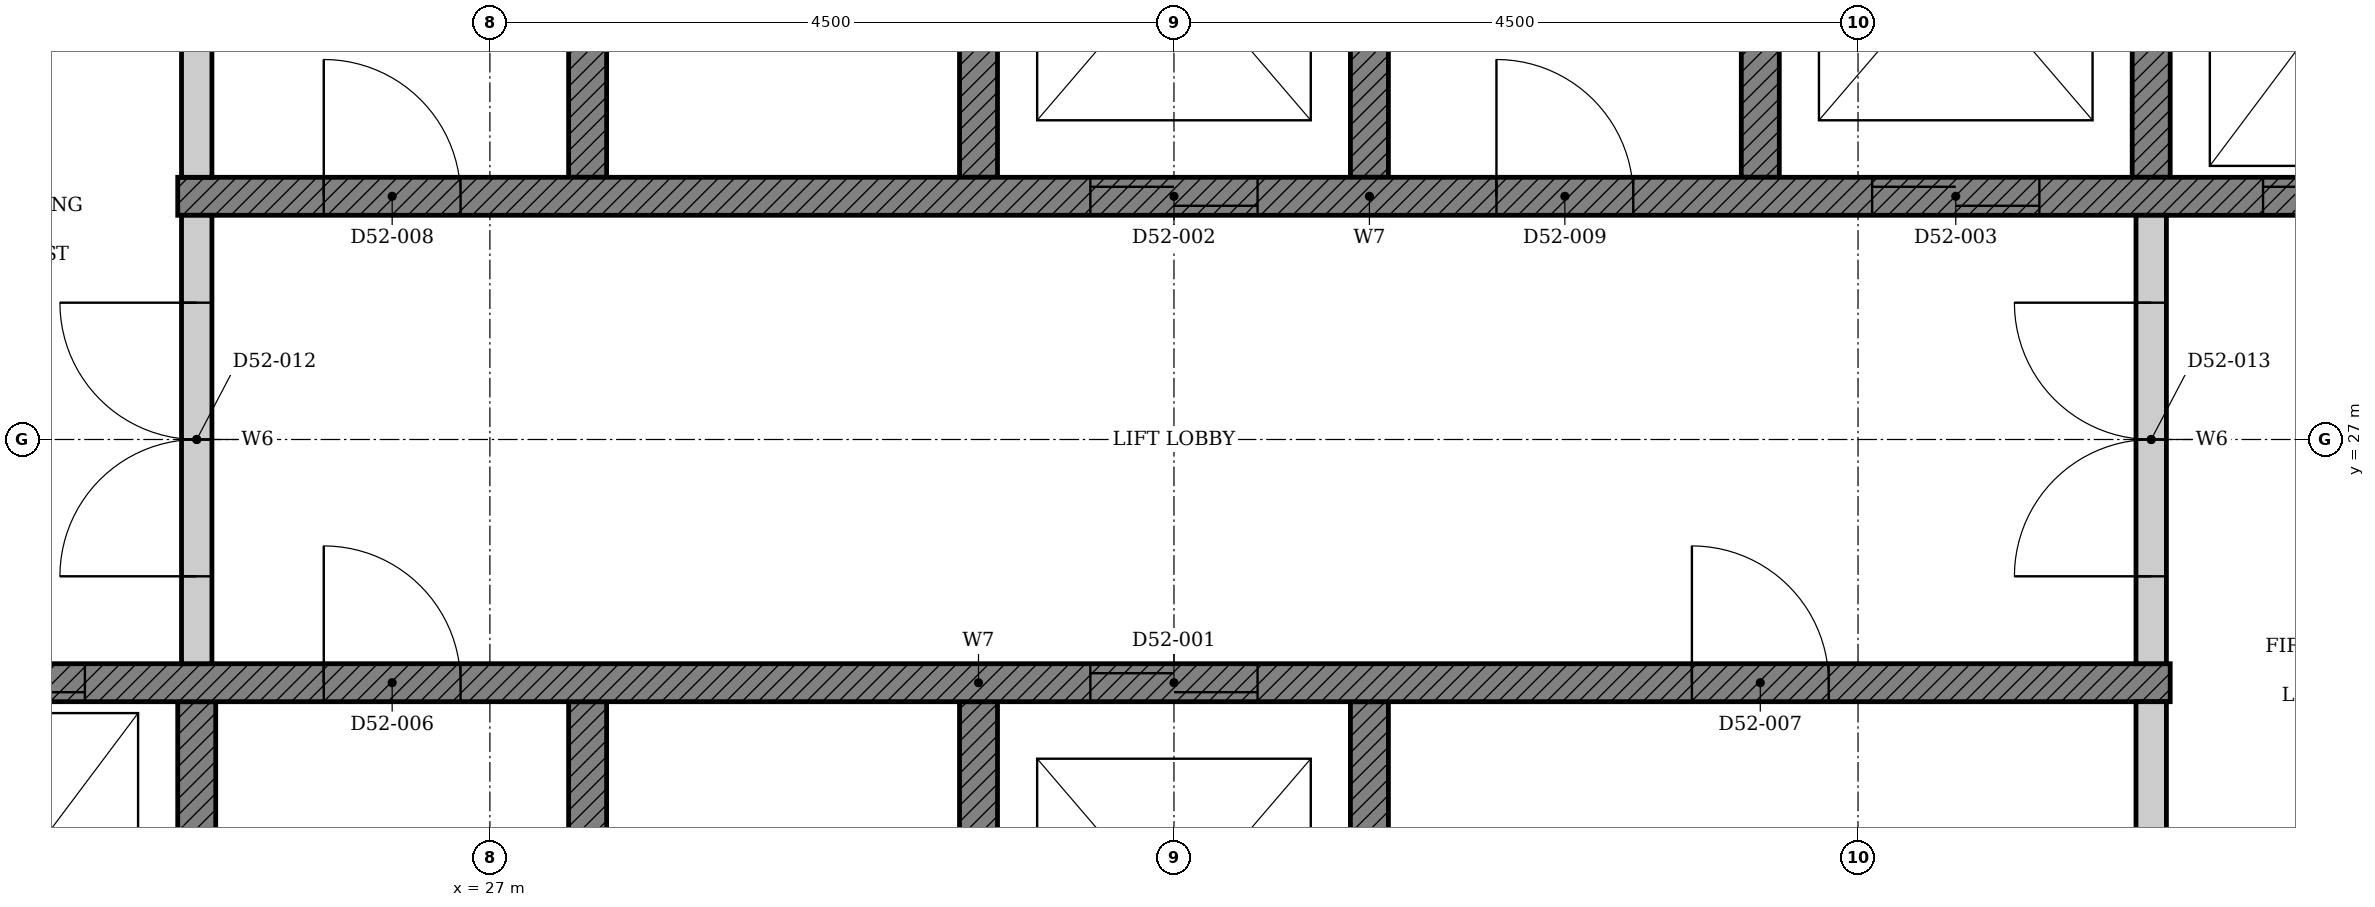
"""IFC4 building model, lengths in metres.
Left out: names, types, materials, properties, quantities, classifications, styles, units other than length and angle.
Written with IfcOpenShell. Run it as: python <this file> out.ifc"""

import sys

from ifc_helpers import new_model, si_unit, direction, frame, frame_2d, origin, place, context, subcontext, project, spatial, polyline, rectangle, outline, extrude, element, fill, save


model = new_model("IFC4")
c1 = context("Model", 3, precision=1e-05, world=origin(), true_north=direction((0.0, 1.0)))
c2 = subcontext(c1, "Body", "Model", "MODEL_VIEW")
j1 = project(units=[si_unit("LENGTHUNIT", "METRE"), si_unit("PLANEANGLEUNIT", "RADIAN")], contexts=[c1])
p1 = place(None, origin())
s1 = spatial("IfcSite", under=j1, at=p1, CompositionType="ELEMENT")
p2 = place(p1, origin())
s2 = spatial("IfcBuilding", under=s1, at=p2, CompositionType="ELEMENT")
p3 = place(p2, frame((0.0, 0.0, 207.2)))
s3 = spatial("IfcBuildingStorey", under=s2, at=p3, CompositionType="ELEMENT", Elevation=207.2)
p4 = place(p3, origin())
e1 = element("IfcWall", 1, at=p4, inside=s3, PredefinedType="SHEAR", context=c2, shape_type="SweptSolid", body=[
    extrude(outline(polyline([(22.375, 22.35), (25.197, 22.35), (25.197, 25.275), (24.947, 25.275), (24.947, 22.65), (22.625, 22.65), (22.625, 25.275), (22.375, 25.275), (22.375, 22.35)])), origin(), (0.0, 0.0, 1.0), 3.4),
])
p5 = place(p3, origin())
e2 = element("IfcWall", 2, at=p5, inside=s3, PredefinedType="SHEAR", context=c2, shape_type="SweptSolid", body=[
    extrude(outline(polyline([(27.518, 22.35), (32.911, 22.35), (32.911, 25.275), (32.661, 25.275), (32.661, 22.65), (30.339, 22.65), (30.339, 25.275), (30.089, 25.275), (30.089, 22.65), (27.768, 22.65), (27.768, 25.275), (27.518, 25.275), (27.518, 22.35)])), origin(), (0.0, 0.0, 1.0), 3.4),
])
p6 = place(p3, origin())
e3 = element("IfcWall", 3, at=p6, inside=s3, PredefinedType="SHEAR", context=c2, shape_type="SweptSolid", body=[
    extrude(outline(polyline([(27.518, 28.725), (27.768, 28.725), (27.768, 31.35), (30.089, 31.35), (30.089, 28.725), (30.339, 28.725), (30.339, 31.35), (32.661, 31.35), (32.661, 28.725), (32.911, 28.725), (32.911, 31.65), (27.518, 31.65), (27.518, 28.725)])), origin(), (0.0, 0.0, 1.0), 3.4),
])
p7 = place(p3, origin())
e4 = element("IfcWall", 4, at=p7, inside=s3, PredefinedType="SHEAR", context=c2, shape_type="SweptSolid", body=[
    extrude(outline(polyline([(35.232, 28.725), (35.482, 28.725), (35.482, 31.35), (37.803, 31.35), (37.803, 28.725), (38.053, 28.725), (38.053, 31.35), (40.375, 31.35), (40.375, 28.725), (40.625, 28.725), (40.625, 31.65), (35.232, 31.65), (35.232, 28.725)])), origin(), (0.0, 0.0, 1.0), 3.4),
])
p8 = place(p3, frame((22.375, 25.4, 0.0), z_axis=(0.0, 0.0, 1.0), x_axis=(1.0, 0.0, 0.0)))
e5 = element("IfcWall", 5, at=p8, inside=s3, PredefinedType="SHEAR", context=c2, shape_type="SweptSolid", body=[
    extrude(rectangle(XDim=15.678, YDim=0.25, at=frame_2d((7.839, 0.0))), origin(), (0.0, 0.0, 1.0), 3.4),
])
p9 = place(p8, frame((8.575, 0.0, 0.0)))
e6 = element("IfcOpeningElement", 6, at=p9, cuts=e5, PredefinedType="OPENING", context=c2, shape_type="SweptSolid", body=[
    extrude(rectangle(XDim=1.1, YDim=2.1, at=frame_2d((0.55, 1.05))), frame((0.0, 0.135, 0.0), z_axis=(0.0, -1.0, 0.0), x_axis=(1.0, 0.0, 0.0)), (0.0, 0.0, 1.0), 0.27),
])
p10 = place(p8, frame((0.861, 0.0, 0.0)))
e7 = element("IfcOpeningElement", 7, at=p10, cuts=e5, PredefinedType="OPENING", context=c2, shape_type="SweptSolid", body=[
    extrude(rectangle(XDim=1.1, YDim=2.1, at=frame_2d((0.55, 1.05))), frame((0.0, 0.135, 0.0), z_axis=(0.0, -1.0, 0.0), x_axis=(1.0, 0.0, 0.0)), (0.0, 0.0, 1.0), 0.27),
])
p11 = place(p8, frame((3.532, 0.0, 0.0)))
e8 = element("IfcOpeningElement", 8, at=p11, cuts=e5, PredefinedType="OPENING", context=c2, shape_type="SweptSolid", body=[
    extrude(rectangle(XDim=0.9, YDim=2.1, at=frame_2d((0.45, 1.05))), frame((0.0, 0.135, 0.0), z_axis=(0.0, -1.0, 0.0), x_axis=(1.0, 0.0, 0.0)), (0.0, 0.0, 1.0), 0.27),
])
p12 = place(p8, frame((12.532, 0.0, 0.0)))
e9 = element("IfcOpeningElement", 9, at=p12, cuts=e5, PredefinedType="OPENING", context=c2, shape_type="SweptSolid", body=[
    extrude(rectangle(XDim=0.9, YDim=2.1, at=frame_2d((0.45, 1.05))), frame((0.0, 0.135, 0.0), z_axis=(0.0, -1.0, 0.0), x_axis=(1.0, 0.0, 0.0)), (0.0, 0.0, 1.0), 0.27),
])
p13 = place(p3, frame((24.947, 28.6, 0.0), z_axis=(0.0, 0.0, 1.0), x_axis=(1.0, 0.0, 0.0)))
e10 = element("IfcWall", 10, at=p13, inside=s3, PredefinedType="SHEAR", context=c2, shape_type="SweptSolid", body=[
    extrude(rectangle(XDim=15.678, YDim=0.25, at=frame_2d((7.839, 0.0))), origin(), (0.0, 0.0, 1.0), 3.4),
])
p14 = place(p13, frame((6.004, 0.0, 0.0)))
e11 = element("IfcOpeningElement", 11, at=p14, cuts=e10, PredefinedType="OPENING", context=c2, shape_type="SweptSolid", body=[
    extrude(rectangle(XDim=1.1, YDim=2.1, at=frame_2d((0.55, 1.05))), frame((0.0, 0.135, 0.0), z_axis=(0.0, -1.0, 0.0), x_axis=(1.0, 0.0, 0.0)), (0.0, 0.0, 1.0), 0.27),
])
p15 = place(p13, frame((11.146, 0.0, 0.0)))
e12 = element("IfcOpeningElement", 12, at=p15, cuts=e10, PredefinedType="OPENING", context=c2, shape_type="SweptSolid", body=[
    extrude(rectangle(XDim=1.1, YDim=2.1, at=frame_2d((0.55, 1.05))), frame((0.0, 0.135, 0.0), z_axis=(0.0, -1.0, 0.0), x_axis=(1.0, 0.0, 0.0)), (0.0, 0.0, 1.0), 0.27),
])
p16 = place(p13, frame((13.718, 0.0, 0.0)))
e13 = element("IfcOpeningElement", 13, at=p16, cuts=e10, PredefinedType="OPENING", context=c2, shape_type="SweptSolid", body=[
    extrude(rectangle(XDim=1.1, YDim=2.1, at=frame_2d((0.55, 1.05))), frame((0.0, 0.135, 0.0), z_axis=(0.0, -1.0, 0.0), x_axis=(1.0, 0.0, 0.0)), (0.0, 0.0, 1.0), 0.27),
])
p17 = place(p13, frame((0.961, 0.0, 0.0)))
e14 = element("IfcOpeningElement", 14, at=p17, cuts=e10, PredefinedType="OPENING", context=c2, shape_type="SweptSolid", body=[
    extrude(rectangle(XDim=0.9, YDim=2.1, at=frame_2d((0.45, 1.05))), frame((0.0, 0.135, 0.0), z_axis=(0.0, -1.0, 0.0), x_axis=(1.0, 0.0, 0.0)), (0.0, 0.0, 1.0), 0.27),
])
p18 = place(p13, frame((8.675, 0.0, 0.0)))
e15 = element("IfcOpeningElement", 15, at=p18, cuts=e10, PredefinedType="OPENING", context=c2, shape_type="SweptSolid", body=[
    extrude(rectangle(XDim=0.9, YDim=2.1, at=frame_2d((0.45, 1.05))), frame((0.0, 0.135, 0.0), z_axis=(0.0, -1.0, 0.0), x_axis=(1.0, 0.0, 0.0)), (0.0, 0.0, 1.0), 0.27),
])
for number, where, z_axis, x_axis in (
    (16, (37.928, 22.65, 0.0), (0.0, 0.0, 1.0), (0.0, 1.0, 0.0)),
    (17, (25.072, 28.725, 0.0), (0.0, 0.0, 1.0), (0.0, 1.0, 0.0)),
):
    element("IfcWall", number, at=place(p3, frame(where, z_axis=z_axis, x_axis=x_axis)), inside=s3, PredefinedType="PARTITIONING", context=c2, shape_type="SweptSolid", body=[
        extrude(rectangle(XDim=2.625, YDim=0.2, at=frame_2d((1.312, 0.0))), origin(), (0.0, 0.0, 1.0), 3.4),
    ])
p19 = place(p3, frame((25.072, 25.525, 0.0), z_axis=(0.0, 0.0, 1.0), x_axis=(0.0, 1.0, 0.0)))
e18 = element("IfcWall", 18, at=p19, inside=s3, PredefinedType="PARTITIONING", context=c2, shape_type="SweptSolid", body=[
    extrude(rectangle(XDim=2.95, YDim=0.2, at=frame_2d((1.475, 0.0))), origin(), (0.0, 0.0, 1.0), 3.4),
])
p20 = place(p19, frame((0.575, 0.0, 0.0)))
e19 = element("IfcOpeningElement", 19, at=p20, cuts=e18, PredefinedType="OPENING", context=c2, shape_type="SweptSolid", body=[
    extrude(rectangle(XDim=1.8, YDim=2.1, at=frame_2d((0.9, 1.05))), frame((0.0, 0.11, 0.0), z_axis=(0.0, -1.0, 0.0), x_axis=(1.0, 0.0, 0.0)), (0.0, 0.0, 1.0), 0.22),
])
p21 = place(p3, frame((37.928, 25.525, 0.0), z_axis=(0.0, 0.0, 1.0), x_axis=(0.0, 1.0, 0.0)))
e20 = element("IfcWall", 20, at=p21, inside=s3, PredefinedType="PARTITIONING", context=c2, shape_type="SweptSolid", body=[
    extrude(rectangle(XDim=2.95, YDim=0.2, at=frame_2d((1.475, 0.0))), origin(), (0.0, 0.0, 1.0), 3.4),
])
p22 = place(p21, frame((0.575, 0.0, 0.0)))
e21 = element("IfcOpeningElement", 21, at=p22, cuts=e20, PredefinedType="OPENING", context=c2, shape_type="SweptSolid", body=[
    extrude(rectangle(XDim=1.8, YDim=2.1, at=frame_2d((0.9, 1.05))), frame((0.0, 0.11, 0.0), z_axis=(0.0, -1.0, 0.0), x_axis=(1.0, 0.0, 0.0)), (0.0, 0.0, 1.0), 0.22),
])
p23 = place(p9, origin())
e22 = element("IfcDoor", 22, at=p23, inside=s3, OperationType="DOUBLE_DOOR_SLIDING", PredefinedType="DOOR", context=c2, shape_type="SweptSolid", body=[
    extrude(rectangle(XDim=1.1, YDim=2.1, at=frame_2d((0.55, 1.05))), frame((0.0, 0.025, 0.0), z_axis=(0.0, -1.0, 0.0), x_axis=(1.0, 0.0, 0.0)), (0.0, 0.0, 1.0), 0.05),
])
fill(e6, e22)
p24 = place(p14, origin())
e23 = element("IfcDoor", 23, at=p24, inside=s3, OperationType="DOUBLE_DOOR_SLIDING", PredefinedType="DOOR", context=c2, shape_type="SweptSolid", body=[
    extrude(rectangle(XDim=1.1, YDim=2.1, at=frame_2d((0.55, 1.05))), frame((0.0, 0.025, 0.0), z_axis=(0.0, -1.0, 0.0), x_axis=(1.0, 0.0, 0.0)), (0.0, 0.0, 1.0), 0.05),
])
fill(e11, e23)
p25 = place(p15, origin())
e24 = element("IfcDoor", 24, at=p25, inside=s3, OperationType="DOUBLE_DOOR_SLIDING", PredefinedType="DOOR", context=c2, shape_type="SweptSolid", body=[
    extrude(rectangle(XDim=1.1, YDim=2.1, at=frame_2d((0.55, 1.05))), frame((0.0, 0.025, 0.0), z_axis=(0.0, -1.0, 0.0), x_axis=(1.0, 0.0, 0.0)), (0.0, 0.0, 1.0), 0.05),
])
fill(e12, e24)
p26 = place(p10, origin())
e25 = element("IfcDoor", 25, at=p26, inside=s3, OperationType="DOUBLE_DOOR_SLIDING", PredefinedType="DOOR", context=c2, shape_type="SweptSolid", body=[
    extrude(rectangle(XDim=1.1, YDim=2.1, at=frame_2d((0.55, 1.05))), frame((0.0, 0.025, 0.0), z_axis=(0.0, -1.0, 0.0), x_axis=(1.0, 0.0, 0.0)), (0.0, 0.0, 1.0), 0.05),
])
fill(e7, e25)
p27 = place(p16, origin())
e26 = element("IfcDoor", 26, at=p27, inside=s3, OperationType="DOUBLE_DOOR_SLIDING", PredefinedType="DOOR", context=c2, shape_type="SweptSolid", body=[
    extrude(rectangle(XDim=1.1, YDim=2.1, at=frame_2d((0.55, 1.05))), frame((0.0, 0.025, 0.0), z_axis=(0.0, -1.0, 0.0), x_axis=(1.0, 0.0, 0.0)), (0.0, 0.0, 1.0), 0.05),
])
fill(e13, e26)
p28 = place(p11, origin())
e27 = element("IfcDoor", 27, at=p28, inside=s3, OperationType="SINGLE_SWING_LEFT", PredefinedType="DOOR", context=c2, shape_type="SweptSolid", body=[
    extrude(rectangle(XDim=0.9, YDim=2.1, at=frame_2d((0.45, 1.05))), frame((0.0, 0.025, 0.0), z_axis=(0.0, -1.0, 0.0), x_axis=(1.0, 0.0, 0.0)), (0.0, 0.0, 1.0), 0.05),
])
fill(e8, e27)
p29 = place(p12, origin())
e28 = element("IfcDoor", 28, at=p29, inside=s3, OperationType="SINGLE_SWING_LEFT", PredefinedType="DOOR", context=c2, shape_type="SweptSolid", body=[
    extrude(rectangle(XDim=0.9, YDim=2.1, at=frame_2d((0.45, 1.05))), frame((0.0, 0.025, 0.0), z_axis=(0.0, -1.0, 0.0), x_axis=(1.0, 0.0, 0.0)), (0.0, 0.0, 1.0), 0.05),
])
fill(e9, e28)
p30 = place(p17, origin())
e29 = element("IfcDoor", 29, at=p30, inside=s3, OperationType="SINGLE_SWING_LEFT", PredefinedType="DOOR", context=c2, shape_type="SweptSolid", body=[
    extrude(rectangle(XDim=0.9, YDim=2.1, at=frame_2d((0.45, 1.05))), frame((0.0, 0.025, 0.0), z_axis=(0.0, -1.0, 0.0), x_axis=(1.0, 0.0, 0.0)), (0.0, 0.0, 1.0), 0.05),
])
fill(e14, e29)
p31 = place(p18, origin())
e30 = element("IfcDoor", 30, at=p31, inside=s3, OperationType="SINGLE_SWING_LEFT", PredefinedType="DOOR", context=c2, shape_type="SweptSolid", body=[
    extrude(rectangle(XDim=0.9, YDim=2.1, at=frame_2d((0.45, 1.05))), frame((0.0, 0.025, 0.0), z_axis=(0.0, -1.0, 0.0), x_axis=(1.0, 0.0, 0.0)), (0.0, 0.0, 1.0), 0.05),
])
fill(e15, e30)
p32 = place(p20, origin())
e31 = element("IfcDoor", 31, at=p32, inside=s3, OperationType="DOUBLE_DOOR_SINGLE_SWING", PredefinedType="DOOR", context=c2, shape_type="SweptSolid", body=[
    extrude(rectangle(XDim=1.8, YDim=2.1, at=frame_2d((0.9, 1.05))), frame((0.0, 0.025, 0.0), z_axis=(0.0, -1.0, 0.0), x_axis=(1.0, 0.0, 0.0)), (0.0, 0.0, 1.0), 0.05),
])
fill(e19, e31)
p33 = place(p22, origin())
e32 = element("IfcDoor", 32, at=p33, inside=s3, OperationType="DOUBLE_DOOR_SINGLE_SWING", PredefinedType="DOOR", context=c2, shape_type="SweptSolid", body=[
    extrude(rectangle(XDim=1.8, YDim=2.1, at=frame_2d((0.9, 1.05))), frame((0.0, 0.025, 0.0), z_axis=(0.0, -1.0, 0.0), x_axis=(1.0, 0.0, 0.0)), (0.0, 0.0, 1.0), 0.05),
])
fill(e21, e32)
save(model, sys.argv[1])
